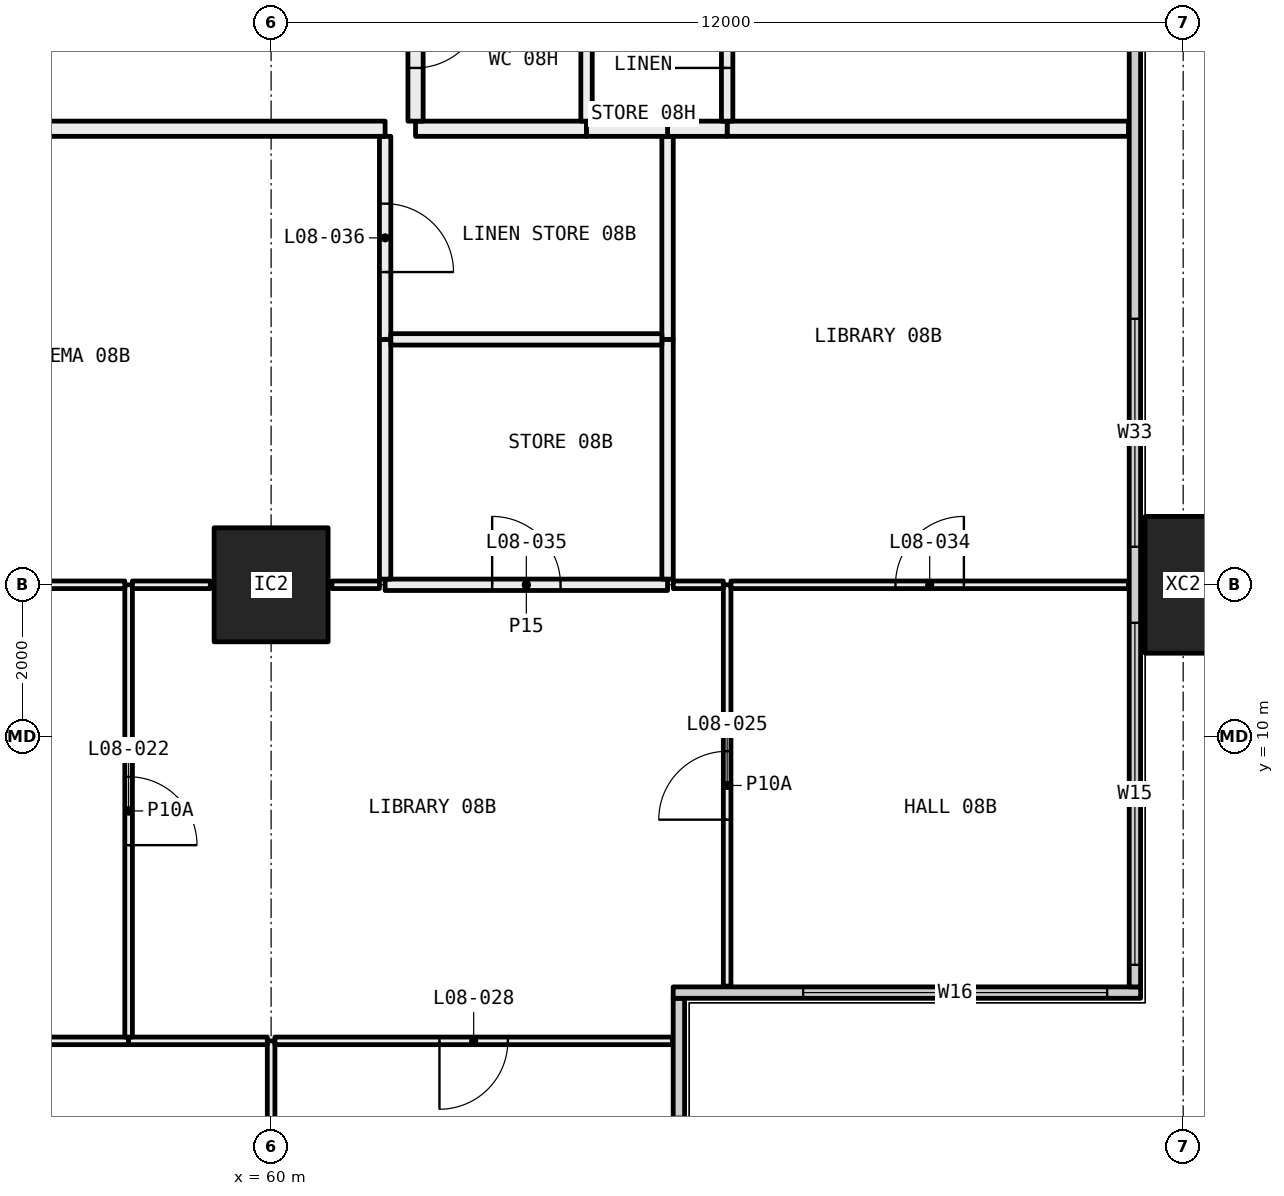
"""IFC4 building model, lengths in metres.
Left out: names, types, materials, properties, quantities, classifications, styles, units other than length and angle.
Written with IfcOpenShell. Run it as: python <this file> out.ifc"""

import sys

from ifc_helpers import new_model, si_unit, direction, frame, frame_2d, origin, origin_2d, place, context, subcontext, project, spatial, rectangle, hollow_rectangle, extrude, element, fill, save


model = new_model("IFC4")
c1 = context("Model", 3, precision=1e-05, world=origin(), true_north=direction((0.0, 1.0)))
c2 = subcontext(c1, "Body", "Model", "MODEL_VIEW")
j1 = project(units=[si_unit("LENGTHUNIT", "METRE"), si_unit("PLANEANGLEUNIT", "RADIAN")], contexts=[c1])
p1 = place(None, origin())
s1 = spatial("IfcSite", under=j1, at=p1, CompositionType="ELEMENT")
p2 = place(p1, origin())
s2 = spatial("IfcBuilding", under=s1, at=p2, CompositionType="ELEMENT")
p3 = place(p2, frame((0.0, 0.0, 40.35)))
s3 = spatial("IfcBuildingStorey", under=s2, at=p3, CompositionType="ELEMENT", Elevation=40.35)
p4 = place(p3, frame((60.0, 12.0, 0.0), z_axis=(0.0, 0.0, 1.0), x_axis=(1.0, 0.0, 0.0)))
e1 = element("IfcColumn", 1, at=p4, inside=s3, PredefinedType="COLUMN", context=c2, shape_type="SweptSolid", body=[
    extrude(hollow_rectangle(XDim=1.5, YDim=1.5, WallThickness=0.065, at=origin_2d()), origin(), (0.0, 0.0, 1.0), 3.05),
])
p5 = place(p3, frame((72.0, 12.0, -0.4), z_axis=(0.0, 0.0, 1.0), x_axis=(0.0, 1.0, 0.0)))
e2 = element("IfcColumn", 2, at=p5, inside=s3, PredefinedType="COLUMN", context=c2, shape_type="SweptSolid", body=[
    extrude(hollow_rectangle(XDim=1.8, YDim=1.0, WallThickness=0.07, at=origin_2d()), origin(), (0.0, 0.0, 1.0), 3.45),
])
p6 = place(p3, frame((65.365, 0.71, 0.0), z_axis=(0.0, 0.0, 1.0), x_axis=(0.0, 1.0, 0.0)))
e3 = element("IfcWall", 3, at=p6, inside=s3, PredefinedType="ELEMENTEDWALL", context=c2, shape_type="SweptSolid", body=[
    extrude(rectangle(XDim=5.85, YDim=0.15, at=frame_2d((2.925, 0.0))), origin(), (0.0, 0.0, 1.0), 3.05),
])
p7 = place(p6, frame((0.29, 0.0, 0.45)))
e4 = element("IfcOpeningElement", 4, at=p7, cuts=e3, PredefinedType="OPENING", context=c2, shape_type="SweptSolid", body=[
    extrude(rectangle(XDim=4.0, YDim=2.55, at=frame_2d((2.0, 1.275))), frame((0.0, 0.085, 0.0), z_axis=(0.0, -1.0, 0.0), x_axis=(1.0, 0.0, 0.0)), (0.0, 0.0, 1.0), 0.17),
])
p8 = place(p3, frame((65.29, 6.635, 0.0), z_axis=(0.0, 0.0, 1.0), x_axis=(1.0, 0.0, 0.0)))
e5 = element("IfcWall", 5, at=p8, inside=s3, PredefinedType="ELEMENTEDWALL", context=c2, shape_type="SweptSolid", body=[
    extrude(rectangle(XDim=6.15, YDim=0.15, at=frame_2d((3.075, 0.0))), origin(), (0.0, 0.0, 1.0), 3.05),
])
p9 = place(p8, frame((1.71, 0.0, 0.45)))
e6 = element("IfcOpeningElement", 6, at=p9, cuts=e5, PredefinedType="OPENING", context=c2, shape_type="SweptSolid", body=[
    extrude(rectangle(XDim=4.0, YDim=2.55, at=frame_2d((2.0, 1.275))), frame((0.0, 0.085, 0.0), z_axis=(0.0, -1.0, 0.0), x_axis=(1.0, 0.0, 0.0)), (0.0, 0.0, 1.0), 0.17),
])
p10 = place(p3, frame((71.365, 6.71, 0.0), z_axis=(0.0, 0.0, 1.0), x_axis=(0.0, 1.0, 0.0)))
e7 = element("IfcWall", 7, at=p10, inside=s3, PredefinedType="ELEMENTEDWALL", context=c2, shape_type="SweptSolid", body=[
    extrude(rectangle(XDim=34.58, YDim=0.15, at=frame_2d((17.29, 0.0))), origin(), (0.0, 0.0, 1.0), 3.05),
])
p11 = place(p10, frame((0.29, 0.0, 0.45)))
e8 = element("IfcOpeningElement", 8, at=p11, cuts=e7, PredefinedType="OPENING", context=c2, shape_type="SweptSolid", body=[
    extrude(rectangle(XDim=4.5, YDim=2.55, at=frame_2d((2.25, 1.275))), frame((0.0, 0.085, 0.0), z_axis=(0.0, -1.0, 0.0), x_axis=(1.0, 0.0, 0.0)), (0.0, 0.0, 1.0), 0.17),
])
p12 = place(p10, frame((5.79, 0.0, 0.45)))
e9 = element("IfcOpeningElement", 9, at=p12, cuts=e7, PredefinedType="OPENING", context=c2, shape_type="SweptSolid", body=[
    extrude(rectangle(XDim=3.0, YDim=2.55, at=frame_2d((1.5, 1.275))), frame((0.0, 0.085, 0.0), z_axis=(0.0, -1.0, 0.0), x_axis=(1.0, 0.0, 0.0)), (0.0, 0.0, 1.0), 0.17),
])
p13 = place(p10, frame((13.79, 0.0, 0.45)))
e10 = element("IfcOpeningElement", 10, at=p13, cuts=e7, PredefinedType="OPENING", context=c2, shape_type="SweptSolid", body=[
    extrude(rectangle(XDim=3.0, YDim=2.55, at=frame_2d((1.5, 1.275))), frame((0.0, 0.085, 0.0), z_axis=(0.0, -1.0, 0.0), x_axis=(1.0, 0.0, 0.0)), (0.0, 0.0, 1.0), 0.17),
])
p14 = place(p10, frame((17.79, 0.0, 0.45)))
e11 = element("IfcOpeningElement", 11, at=p14, cuts=e7, PredefinedType="OPENING", context=c2, shape_type="SweptSolid", body=[
    extrude(rectangle(XDim=3.0, YDim=2.55, at=frame_2d((1.5, 1.275))), frame((0.0, 0.085, 0.0), z_axis=(0.0, -1.0, 0.0), x_axis=(1.0, 0.0, 0.0)), (0.0, 0.0, 1.0), 0.17),
])
p15 = place(p10, frame((26.79, 0.0, 0.45)))
e12 = element("IfcOpeningElement", 12, at=p15, cuts=e7, PredefinedType="OPENING", context=c2, shape_type="SweptSolid", body=[
    extrude(rectangle(XDim=2.0, YDim=2.55, at=frame_2d((1.0, 1.275))), frame((0.0, 0.085, 0.0), z_axis=(0.0, -1.0, 0.0), x_axis=(1.0, 0.0, 0.0)), (0.0, 0.0, 1.0), 0.17),
])
p16 = place(p10, frame((29.79, 0.0, 0.45)))
e13 = element("IfcOpeningElement", 13, at=p16, cuts=e7, PredefinedType="OPENING", context=c2, shape_type="SweptSolid", body=[
    extrude(rectangle(XDim=4.5, YDim=2.55, at=frame_2d((2.25, 1.275))), frame((0.0, 0.085, 0.0), z_axis=(0.0, -1.0, 0.0), x_axis=(1.0, 0.0, 0.0)), (0.0, 0.0, 1.0), 0.17),
])
p17 = place(p3, frame((60.0, 0.72, 0.0), z_axis=(0.0, 0.0, 1.0), x_axis=(0.0, 1.0, 0.0)))
e14 = element("IfcWall", 14, at=p17, inside=s3, PredefinedType="PARTITIONING", context=c2, shape_type="SweptSolid", body=[
    extrude(rectangle(XDim=5.28, YDim=0.1, at=frame_2d((2.64, 0.0))), origin(), (0.0, 0.0, 1.0), 2.45),
])
p18 = place(p3, frame((58.125, 6.0, 0.0), z_axis=(0.0, 0.0, 1.0), x_axis=(-1.0, 0.0, 0.0)))
e15 = element("IfcWall", 15, at=p18, inside=s3, PredefinedType="PARTITIONING", context=c2, shape_type="SweptSolid", body=[
    extrude(rectangle(XDim=4.075, YDim=0.1, at=frame_2d((2.038, 0.0))), origin(), (0.0, 0.0, 1.0), 3.05),
])
p19 = place(p3, frame((59.95, 6.0, 0.0), z_axis=(0.0, 0.0, 1.0), x_axis=(-1.0, 0.0, 0.0)))
e16 = element("IfcWall", 16, at=p19, inside=s3, PredefinedType="PARTITIONING", context=c2, shape_type="SweptSolid", body=[
    extrude(rectangle(XDim=1.825, YDim=0.1, at=frame_2d((0.913, 0.0))), origin(), (0.0, 0.0, 1.0), 2.45),
])
p20 = place(p3, frame((65.28, 6.0, 0.0), z_axis=(0.0, 0.0, 1.0), x_axis=(-1.0, 0.0, 0.0)))
e17 = element("IfcWall", 17, at=p20, inside=s3, PredefinedType="PARTITIONING", context=c2, shape_type="SweptSolid", body=[
    extrude(rectangle(XDim=5.23, YDim=0.1, at=frame_2d((2.615, 0.0))), origin(), (0.0, 0.0, 1.0), 2.45),
])
p21 = place(p20, frame((2.165, 0.0, 0.0)))
e18 = element("IfcOpeningElement", 18, at=p21, cuts=e17, PredefinedType="OPENING", context=c2, shape_type="SweptSolid", body=[
    extrude(rectangle(XDim=0.9, YDim=2.1, at=frame_2d((0.45, 1.05))), frame((0.0, 0.06, 0.0), z_axis=(0.0, -1.0, 0.0), x_axis=(1.0, 0.0, 0.0)), (0.0, 0.0, 1.0), 0.12),
])
p22 = place(p3, frame((58.125, 6.05, 0.0), z_axis=(0.0, 0.0, 1.0), x_axis=(0.0, 1.0, 0.0)))
e19 = element("IfcWall", 19, at=p22, inside=s3, PredefinedType="PARTITIONING", context=c2, shape_type="SweptSolid", body=[
    extrude(rectangle(XDim=5.95, YDim=0.1, at=frame_2d((2.975, 0.0))), origin(), (0.0, 0.0, 1.0), 2.45),
])
p23 = place(p22, frame((2.525, 0.0, 0.0)))
e20 = element("IfcOpeningElement", 20, at=p23, cuts=e19, PredefinedType="OPENING", context=c2, shape_type="SweptSolid", body=[
    extrude(rectangle(XDim=0.9, YDim=2.1, at=frame_2d((0.45, 1.05))), frame((0.0, 0.06, 0.0), z_axis=(0.0, -1.0, 0.0), x_axis=(1.0, 0.0, 0.0)), (0.0, 0.0, 1.0), 0.12),
])
p24 = place(p3, frame((58.075, 12.0, 0.0), z_axis=(0.0, 0.0, 1.0), x_axis=(-1.0, 0.0, 0.0)))
e21 = element("IfcWall", 21, at=p24, inside=s3, PredefinedType="PARTITIONING", context=c2, shape_type="SweptSolid", body=[
    extrude(rectangle(XDim=5.575, YDim=0.1, at=frame_2d((2.788, 0.0))), origin(), (0.0, 0.0, 1.0), 2.45),
])
p25 = place(p3, frame((66.0, 6.72, 0.0), z_axis=(0.0, 0.0, 1.0), x_axis=(0.0, 1.0, 0.0)))
e22 = element("IfcWall", 22, at=p25, inside=s3, PredefinedType="PARTITIONING", context=c2, shape_type="SweptSolid", body=[
    extrude(rectangle(XDim=5.28, YDim=0.1, at=frame_2d((2.64, 0.0))), origin(), (0.0, 0.0, 1.0), 2.45),
])
p26 = place(p25, frame((2.19, 0.0, 0.0)))
e23 = element("IfcOpeningElement", 23, at=p26, cuts=e22, PredefinedType="OPENING", context=c2, shape_type="SweptSolid", body=[
    extrude(rectangle(XDim=0.9, YDim=2.1, at=frame_2d((0.45, 1.05))), frame((0.0, 0.06, 0.0), z_axis=(0.0, -1.0, 0.0), x_axis=(1.0, 0.0, 0.0)), (0.0, 0.0, 1.0), 0.12),
])
p27 = place(p3, frame((59.2, 12.0, 0.0), z_axis=(0.0, 0.0, 1.0), x_axis=(-1.0, 0.0, 0.0)))
e24 = element("IfcWall", 24, at=p27, inside=s3, PredefinedType="PARTITIONING", context=c2, shape_type="SweptSolid", body=[
    extrude(rectangle(XDim=1.025, YDim=0.1, at=frame_2d((0.512, 0.0))), origin(), (0.0, 0.0, 1.0), 2.45),
])
p28 = place(p3, frame((61.425, 12.0, 0.0), z_axis=(0.0, 0.0, 1.0), x_axis=(-1.0, 0.0, 0.0)))
e25 = element("IfcWall", 25, at=p28, inside=s3, PredefinedType="PARTITIONING", context=c2, shape_type="SweptSolid", body=[
    extrude(rectangle(XDim=0.625, YDim=0.1, at=frame_2d((0.312, 0.0))), origin(), (0.0, 0.0, 1.0), 2.45),
])
p29 = place(p3, frame((65.95, 12.0, 0.0), z_axis=(0.0, 0.0, 1.0), x_axis=(-1.0, 0.0, 0.0)))
e26 = element("IfcWall", 26, at=p29, inside=s3, PredefinedType="PARTITIONING", context=c2, shape_type="SweptSolid", body=[
    extrude(rectangle(XDim=0.659, YDim=0.1, at=frame_2d((0.33, 0.0))), origin(), (0.0, 0.0, 1.0), 2.45),
])
p30 = place(p3, frame((65.216, 12.0, 0.0), z_axis=(0.0, 0.0, 1.0), x_axis=(-1.0, 0.0, 0.0)))
e27 = element("IfcWall", 27, at=p30, inside=s3, PredefinedType="PARTITIONING", context=c2, shape_type="SweptSolid", body=[
    extrude(rectangle(XDim=3.716, YDim=0.15, at=frame_2d((1.858, 0.0))), origin(), (0.0, 0.0, 1.0), 2.45),
])
p31 = place(p30, frame((1.408, 0.0, 0.0)))
e28 = element("IfcOpeningElement", 28, at=p31, cuts=e27, PredefinedType="OPENING", context=c2, shape_type="SweptSolid", body=[
    extrude(rectangle(XDim=0.9, YDim=2.1, at=frame_2d((0.45, 1.05))), frame((0.0, 0.085, 0.0), z_axis=(0.0, -1.0, 0.0), x_axis=(1.0, 0.0, 0.0)), (0.0, 0.0, 1.0), 0.17),
])
p32 = place(p3, frame((71.28, 12.0, 0.0), z_axis=(0.0, 0.0, 1.0), x_axis=(-1.0, 0.0, 0.0)))
e29 = element("IfcWall", 29, at=p32, inside=s3, PredefinedType="PARTITIONING", context=c2, shape_type="SweptSolid", body=[
    extrude(rectangle(XDim=5.23, YDim=0.1, at=frame_2d((2.615, 0.0))), origin(), (0.0, 0.0, 1.0), 2.45),
])
p33 = place(p32, frame((2.165, 0.0, 0.0)))
e30 = element("IfcOpeningElement", 30, at=p33, cuts=e29, PredefinedType="OPENING", context=c2, shape_type="SweptSolid", body=[
    extrude(rectangle(XDim=0.9, YDim=2.1, at=frame_2d((0.45, 1.05))), frame((0.0, 0.06, 0.0), z_axis=(0.0, -1.0, 0.0), x_axis=(1.0, 0.0, 0.0)), (0.0, 0.0, 1.0), 0.12),
])
p34 = place(p3, frame((61.5, 12.075, 0.0), z_axis=(0.0, 0.0, 1.0), x_axis=(0.0, 1.0, 0.0)))
e31 = element("IfcWall", 31, at=p34, inside=s3, PredefinedType="PARTITIONING", context=c2, shape_type="SweptSolid", body=[
    extrude(rectangle(XDim=3.154, YDim=0.15, at=frame_2d((1.577, 0.0))), origin(), (0.0, 0.0, 1.0), 2.45),
])
p35 = place(p3, frame((61.5, 15.229, 0.0), z_axis=(0.0, 0.0, 1.0), x_axis=(0.0, 1.0, 0.0)))
e32 = element("IfcWall", 32, at=p35, inside=s3, PredefinedType="PARTITIONING", context=c2, shape_type="SweptSolid", body=[
    extrude(rectangle(XDim=2.671, YDim=0.15, at=frame_2d((1.335, 0.0))), origin(), (0.0, 0.0, 1.0), 3.05),
])
p36 = place(p35, frame((0.885, 0.0, 0.0)))
e33 = element("IfcOpeningElement", 33, at=p36, cuts=e32, PredefinedType="OPENING", context=c2, shape_type="SweptSolid", body=[
    extrude(rectangle(XDim=0.9, YDim=2.1, at=frame_2d((0.45, 1.05))), frame((0.0, 0.085, 0.0), z_axis=(0.0, -1.0, 0.0), x_axis=(1.0, 0.0, 0.0)), (0.0, 0.0, 1.0), 0.17),
])
p37 = place(p3, frame((61.5, 18.0, 0.0), z_axis=(0.0, 0.0, 1.0), x_axis=(-1.0, 0.0, 0.0)))
e34 = element("IfcWall", 34, at=p37, inside=s3, PredefinedType="PARTITIONING", context=c2, shape_type="SweptSolid", body=[
    extrude(rectangle(XDim=9.0, YDim=0.2, at=frame_2d((4.5, 0.0))), origin(), (0.0, 0.0, 1.0), 3.05),
])
p38 = place(p3, frame((65.216, 15.229, 0.0), z_axis=(0.0, 0.0, 1.0), x_axis=(0.0, -1.0, 0.0)))
e35 = element("IfcWall", 35, at=p38, inside=s3, PredefinedType="PARTITIONING", context=c2, shape_type="SweptSolid", body=[
    extrude(rectangle(XDim=3.154, YDim=0.15, at=frame_2d((1.577, 0.0))), origin(), (0.0, 0.0, 1.0), 2.45),
])
p39 = place(p3, frame((65.216, 17.9, 0.0), z_axis=(0.0, 0.0, 1.0), x_axis=(0.0, -1.0, 0.0)))
e36 = element("IfcWall", 36, at=p39, inside=s3, PredefinedType="PARTITIONING", context=c2, shape_type="SweptSolid", body=[
    extrude(rectangle(XDim=2.671, YDim=0.15, at=frame_2d((1.335, 0.0))), origin(), (0.0, 0.0, 1.0), 3.05),
])
p40 = place(p3, frame((71.28, 18.0, 0.0), z_axis=(0.0, 0.0, 1.0), x_axis=(-1.0, 0.0, 0.0)))
e37 = element("IfcWall", 37, at=p40, inside=s3, PredefinedType="PARTITIONING", context=c2, shape_type="SweptSolid", body=[
    extrude(rectangle(XDim=5.28, YDim=0.2, at=frame_2d((2.64, 0.0))), origin(), (0.0, 0.0, 1.0), 3.05),
])
p41 = place(p3, frame((66.0, 18.0, 0.0), z_axis=(0.0, 0.0, 1.0), x_axis=(-1.0, 0.0, 0.0)))
e38 = element("IfcWall", 38, at=p41, inside=s3, PredefinedType="PARTITIONING", context=c2, shape_type="SweptSolid", body=[
    extrude(rectangle(XDim=0.784, YDim=0.2, at=frame_2d((0.392, 0.0))), origin(), (0.0, 0.0, 1.0), 3.05),
])
p42 = place(p3, frame((65.141, 15.229, 0.0), z_axis=(0.0, 0.0, 1.0), x_axis=(-1.0, 0.0, 0.0)))
e39 = element("IfcWall", 39, at=p42, inside=s3, PredefinedType="PARTITIONING", context=c2, shape_type="SweptSolid", body=[
    extrude(rectangle(XDim=3.566, YDim=0.15, at=frame_2d((1.783, 0.0))), origin(), (0.0, 0.0, 1.0), 3.05),
])
p43 = place(p3, frame((64.15, 18.0, 0.0), z_axis=(0.0, 0.0, 1.0), x_axis=(-1.0, 0.0, 0.0)))
e40 = element("IfcWall", 40, at=p43, inside=s3, PredefinedType="PARTITIONING", context=c2, shape_type="SweptSolid", body=[
    extrude(rectangle(XDim=2.25, YDim=0.2, at=frame_2d((1.125, 0.0))), origin(), (0.0, 0.0, 1.0), 3.05),
])
p44 = place(p3, frame((65.216, 18.0, 0.0), z_axis=(0.0, 0.0, 1.0), x_axis=(-1.0, 0.0, 0.0)))
e41 = element("IfcWall", 41, at=p44, inside=s3, PredefinedType="PARTITIONING", context=c2, shape_type="SweptSolid", body=[
    extrude(rectangle(XDim=1.066, YDim=0.2, at=frame_2d((0.533, 0.0))), origin(), (0.0, 0.0, 1.0), 3.05),
])
p45 = place(p3, frame((66.0, 20.4, 0.0), z_axis=(0.0, 0.0, 1.0), x_axis=(0.0, -1.0, 0.0)))
e42 = element("IfcWall", 42, at=p45, inside=s3, PredefinedType="PARTITIONING", context=c2, shape_type="SweptSolid", body=[
    extrude(rectangle(XDim=2.3, YDim=0.15, at=frame_2d((1.15, 0.0))), origin(), (0.0, 0.0, 1.0), 3.05),
])
p46 = place(p45, frame((0.7, 0.0, 0.0)))
e43 = element("IfcOpeningElement", 43, at=p46, cuts=e42, PredefinedType="OPENING", context=c2, shape_type="SweptSolid", body=[
    extrude(rectangle(XDim=0.9, YDim=2.1, at=frame_2d((0.45, 1.05))), frame((0.0, 0.085, 0.0), z_axis=(0.0, -1.0, 0.0), x_axis=(1.0, 0.0, 0.0)), (0.0, 0.0, 1.0), 0.17),
])
p47 = place(p3, frame((64.15, 18.1, 0.0), z_axis=(0.0, 0.0, 1.0), x_axis=(0.0, 1.0, 0.0)))
e44 = element("IfcWall", 44, at=p47, inside=s3, PredefinedType="PARTITIONING", context=c2, shape_type="SweptSolid", body=[
    extrude(rectangle(XDim=2.3, YDim=0.15, at=frame_2d((1.15, 0.0))), origin(), (0.0, 0.0, 1.0), 3.05),
])
p48 = place(p3, frame((61.9, 20.4, 0.0), z_axis=(0.0, 0.0, 1.0), x_axis=(0.0, -1.0, 0.0)))
e45 = element("IfcWall", 45, at=p48, inside=s3, PredefinedType="PARTITIONING", context=c2, shape_type="SweptSolid", body=[
    extrude(rectangle(XDim=2.3, YDim=0.2, at=frame_2d((1.15, 0.0))), origin(), (0.0, 0.0, 1.0), 3.05),
])
p49 = place(p48, frame((0.7, 0.0, 0.0)))
e46 = element("IfcOpeningElement", 46, at=p49, cuts=e45, PredefinedType="OPENING", context=c2, shape_type="SweptSolid", body=[
    extrude(rectangle(XDim=0.9, YDim=2.1, at=frame_2d((0.45, 1.05))), frame((0.0, 0.11, 0.0), z_axis=(0.0, -1.0, 0.0), x_axis=(1.0, 0.0, 0.0)), (0.0, 0.0, 1.0), 0.22),
])
p50 = place(p9, origin())
e47 = element("IfcWindow", 47, at=p50, inside=s3, PartitioningType="SINGLE_PANEL", PredefinedType="WINDOW", context=c2, shape_type="SweptSolid", body=[
    extrude(rectangle(XDim=4.0, YDim=2.55, at=frame_2d((2.0, 1.275))), frame((0.0, 0.03, 0.0), z_axis=(0.0, -1.0, 0.0), x_axis=(1.0, 0.0, 0.0)), (0.0, 0.0, 1.0), 0.06),
])
fill(e6, e47)
p51 = place(p11, origin())
e48 = element("IfcWindow", 48, at=p51, inside=s3, PartitioningType="SINGLE_PANEL", PredefinedType="WINDOW", context=c2, shape_type="SweptSolid", body=[
    extrude(rectangle(XDim=4.5, YDim=2.55, at=frame_2d((2.25, 1.275))), frame((0.0, 0.03, 0.0), z_axis=(0.0, -1.0, 0.0), x_axis=(1.0, 0.0, 0.0)), (0.0, 0.0, 1.0), 0.06),
])
fill(e8, e48)
p52 = place(p12, origin())
e49 = element("IfcWindow", 49, at=p52, inside=s3, PartitioningType="SINGLE_PANEL", PredefinedType="WINDOW", context=c2, shape_type="SweptSolid", body=[
    extrude(rectangle(XDim=3.0, YDim=2.55, at=frame_2d((1.5, 1.275))), frame((0.0, 0.03, 0.0), z_axis=(0.0, -1.0, 0.0), x_axis=(1.0, 0.0, 0.0)), (0.0, 0.0, 1.0), 0.06),
])
fill(e9, e49)
p53 = place(p23, frame((0.9, 0.0, 0.0), x_axis=(-1.0, 0.0, 0.0)))
e50 = element("IfcDoor", 50, at=p53, inside=s3, OperationType="SINGLE_SWING_LEFT", PredefinedType="DOOR", context=c2, shape_type="SweptSolid", body=[
    extrude(rectangle(XDim=0.9, YDim=2.1, at=frame_2d((0.45, 1.05))), frame((0.0, 0.025, 0.0), z_axis=(0.0, -1.0, 0.0), x_axis=(1.0, 0.0, 0.0)), (0.0, 0.0, 1.0), 0.05),
])
fill(e20, e50)
p54 = place(p26, origin())
e51 = element("IfcDoor", 51, at=p54, inside=s3, OperationType="SINGLE_SWING_RIGHT", PredefinedType="DOOR", context=c2, shape_type="SweptSolid", body=[
    extrude(rectangle(XDim=0.9, YDim=2.1, at=frame_2d((0.45, 1.05))), frame((0.0, 0.025, 0.0), z_axis=(0.0, -1.0, 0.0), x_axis=(1.0, 0.0, 0.0)), (0.0, 0.0, 1.0), 0.05),
])
fill(e23, e51)
p55 = place(p21, origin())
e52 = element("IfcDoor", 52, at=p55, inside=s3, OperationType="SINGLE_SWING_LEFT", PredefinedType="DOOR", context=c2, shape_type="SweptSolid", body=[
    extrude(rectangle(XDim=0.9, YDim=2.1, at=frame_2d((0.45, 1.05))), frame((0.0, 0.025, 0.0), z_axis=(0.0, -1.0, 0.0), x_axis=(1.0, 0.0, 0.0)), (0.0, 0.0, 1.0), 0.05),
])
fill(e18, e52)
p56 = place(p33, frame((0.9, 0.0, 0.0), x_axis=(-1.0, 0.0, 0.0)))
e53 = element("IfcDoor", 53, at=p56, inside=s3, OperationType="SINGLE_SWING_LEFT", PredefinedType="DOOR", context=c2, shape_type="SweptSolid", body=[
    extrude(rectangle(XDim=0.9, YDim=2.1, at=frame_2d((0.45, 1.05))), frame((0.0, 0.025, 0.0), z_axis=(0.0, -1.0, 0.0), x_axis=(1.0, 0.0, 0.0)), (0.0, 0.0, 1.0), 0.05),
])
fill(e30, e53)
p57 = place(p31, frame((0.9, 0.0, 0.0), x_axis=(-1.0, 0.0, 0.0)))
e54 = element("IfcDoor", 54, at=p57, inside=s3, OperationType="SINGLE_SWING_RIGHT", PredefinedType="DOOR", context=c2, shape_type="SweptSolid", body=[
    extrude(rectangle(XDim=0.9, YDim=2.1, at=frame_2d((0.45, 1.05))), frame((0.0, 0.025, 0.0), z_axis=(0.0, -1.0, 0.0), x_axis=(1.0, 0.0, 0.0)), (0.0, 0.0, 1.0), 0.05),
])
fill(e28, e54)
p58 = place(p36, frame((0.9, 0.0, 0.0), x_axis=(-1.0, 0.0, 0.0)))
e55 = element("IfcDoor", 55, at=p58, inside=s3, OperationType="SINGLE_SWING_LEFT", PredefinedType="DOOR", context=c2, shape_type="SweptSolid", body=[
    extrude(rectangle(XDim=0.9, YDim=2.1, at=frame_2d((0.45, 1.05))), frame((0.0, 0.025, 0.0), z_axis=(0.0, -1.0, 0.0), x_axis=(1.0, 0.0, 0.0)), (0.0, 0.0, 1.0), 0.05),
])
fill(e33, e55)
p59 = place(p46, frame((0.9, 0.0, 0.0), x_axis=(-1.0, 0.0, 0.0)))
e56 = element("IfcDoor", 56, at=p59, inside=s3, OperationType="SINGLE_SWING_RIGHT", PredefinedType="DOOR", context=c2, shape_type="SweptSolid", body=[
    extrude(rectangle(XDim=0.9, YDim=2.1, at=frame_2d((0.45, 1.05))), frame((0.0, 0.025, 0.0), z_axis=(0.0, -1.0, 0.0), x_axis=(1.0, 0.0, 0.0)), (0.0, 0.0, 1.0), 0.05),
])
fill(e43, e56)
p60 = place(p49, origin())
e57 = element("IfcDoor", 57, at=p60, inside=s3, OperationType="SINGLE_SWING_RIGHT", PredefinedType="DOOR", context=c2, shape_type="SweptSolid", body=[
    extrude(rectangle(XDim=0.9, YDim=2.1, at=frame_2d((0.45, 1.05))), frame((0.0, 0.025, 0.0), z_axis=(0.0, -1.0, 0.0), x_axis=(1.0, 0.0, 0.0)), (0.0, 0.0, 1.0), 0.05),
])
fill(e46, e57)
save(model, sys.argv[1])
